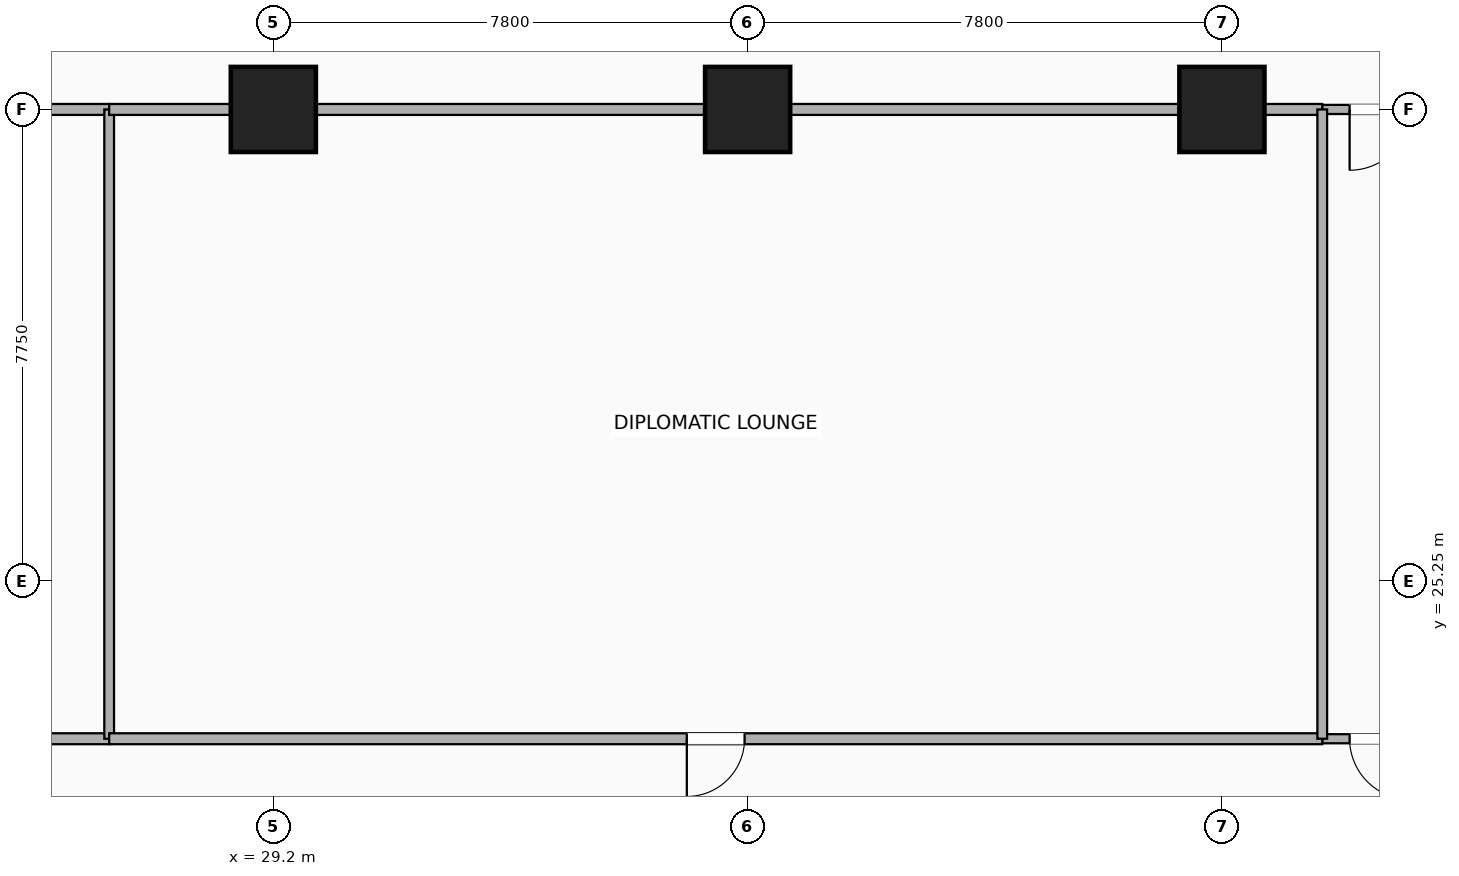
"""IFC4 building model, lengths in metres.
Left out: names, types, materials, properties, quantities, classifications, styles, units other than length and angle.
Written with IfcOpenShell. Run it as: python <this file> out.ifc"""

import sys

from ifc_helpers import new_model, si_unit, direction, frame, frame_2d, origin, origin_2d, place, context, subcontext, project, spatial, rectangle, extrude, element, fill, save


model = new_model("IFC4")
c1 = context("Model", 3, precision=1e-05, world=origin(), true_north=direction((0.0, 1.0)))
c2 = subcontext(c1, "Body", "Model", "MODEL_VIEW")
j1 = project(units=[si_unit("LENGTHUNIT", "METRE"), si_unit("PLANEANGLEUNIT", "RADIAN")], contexts=[c1])
p1 = place(None, origin())
s1 = spatial("IfcSite", under=j1, at=p1, CompositionType="ELEMENT")
p2 = place(p1, origin())
s2 = spatial("IfcBuilding", under=s1, at=p2, CompositionType="ELEMENT")
p3 = place(p2, frame((0.0, 0.0, 71.9)))
s3 = spatial("IfcBuildingStorey", under=s2, at=p3, CompositionType="ELEMENT", Elevation=71.9)
for number, where, z_axis, x_axis in (
    (1, (29.2, 33.0, -0.28), (0.0, 0.0, 1.0), (1.0, 0.0, 0.0)),
    (2, (37.0, 33.0, -0.28), (0.0, 0.0, 1.0), (1.0, 0.0, 0.0)),
    (3, (44.8, 33.0, -0.28), (0.0, 0.0, 1.0), (1.0, 0.0, 0.0)),
):
    element("IfcColumn", number, at=place(p3, frame(where, z_axis=z_axis, x_axis=x_axis)), inside=s3, PredefinedType="COLUMN", context=c2, shape_type="SweptSolid", body=[
        extrude(rectangle(XDim=1.4, YDim=1.4, at=origin_2d()), origin(), (0.0, 0.0, 1.0), 3.46),
    ])
p4 = place(p3, frame((46.45, 22.65, 0.0), z_axis=(0.0, 0.0, 1.0), x_axis=(1.0, 0.0, 0.0)))
e4 = element("IfcWall", 4, at=p4, inside=s3, PredefinedType="PARTITIONING", context=c2, shape_type="SweptSolid", body=[
    extrude(rectangle(XDim=2.0, YDim=0.15, at=frame_2d((1.0, 0.0))), origin(), (0.0, 0.0, 1.0), 3.18),
])
p5 = place(p4, frame((0.45, 0.0, 0.0)))
e5 = element("IfcOpeningElement", 5, at=p5, cuts=e4, PredefinedType="OPENING", context=c2, shape_type="SweptSolid", body=[
    extrude(rectangle(XDim=1.0, YDim=2.15, at=frame_2d((0.5, 1.075))), frame((0.0, 0.085, 0.0), z_axis=(0.0, -1.0, 0.0), x_axis=(1.0, 0.0, 0.0)), (0.0, 0.0, 1.0), 0.17),
])
p6 = place(p3, frame((46.45, 33.0, 0.0), z_axis=(0.0, 0.0, 1.0), x_axis=(1.0, 0.0, 0.0)))
e6 = element("IfcWall", 6, at=p6, inside=s3, PredefinedType="PARTITIONING", context=c2, shape_type="SweptSolid", body=[
    extrude(rectangle(XDim=2.0, YDim=0.15, at=frame_2d((1.0, 0.0))), origin(), (0.0, 0.0, 1.0), 2.47),
])
p7 = place(p6, frame((0.45, 0.0, 0.0)))
e7 = element("IfcOpeningElement", 7, at=p7, cuts=e6, PredefinedType="OPENING", context=c2, shape_type="SweptSolid", body=[
    extrude(rectangle(XDim=1.0, YDim=2.15, at=frame_2d((0.5, 1.075))), frame((0.0, 0.085, 0.0), z_axis=(0.0, -1.0, 0.0), x_axis=(1.0, 0.0, 0.0)), (0.0, 0.0, 1.0), 0.17),
])
p8 = place(p3, frame((18.65, 22.65, 0.0), z_axis=(0.0, 0.0, 1.0), x_axis=(1.0, 0.0, 0.0)))
e8 = element("IfcWall", 8, at=p8, inside=s3, PredefinedType="PARTITIONING", context=c2, shape_type="SweptSolid", body=[
    extrude(rectangle(XDim=7.85, YDim=0.18, at=frame_2d((3.925, 0.0))), origin(), (0.0, 0.0, 1.0), 2.47),
])
p9 = place(p8, frame((3.45, 0.0, 0.0)))
e9 = element("IfcOpeningElement", 9, at=p9, cuts=e8, PredefinedType="OPENING", context=c2, shape_type="SweptSolid", body=[
    extrude(rectangle(XDim=0.95, YDim=2.15, at=frame_2d((0.475, 1.075))), frame((0.0, 0.1, 0.0), z_axis=(0.0, -1.0, 0.0), x_axis=(1.0, 0.0, 0.0)), (0.0, 0.0, 1.0), 0.2),
])
p10 = place(p3, frame((18.65, 33.0, 0.0), z_axis=(0.0, 0.0, 1.0), x_axis=(1.0, 0.0, 0.0)))
e10 = element("IfcWall", 10, at=p10, inside=s3, PredefinedType="PARTITIONING", context=c2, shape_type="SweptSolid", body=[
    extrude(rectangle(XDim=7.85, YDim=0.18, at=frame_2d((3.925, 0.0))), origin(), (0.0, 0.0, 1.0), 2.47),
])
p11 = place(p3, frame((26.5, 22.65, 0.0), z_axis=(0.0, 0.0, 1.0), x_axis=(0.0, 1.0, 0.0)))
e11 = element("IfcWall", 11, at=p11, inside=s3, PredefinedType="PARTITIONING", context=c2, shape_type="SweptSolid", body=[
    extrude(rectangle(XDim=10.35, YDim=0.16, at=frame_2d((5.175, 0.0))), origin(), (0.0, 0.0, 1.0), 2.47),
])
p12 = place(p3, frame((26.5, 22.65, 0.0), z_axis=(0.0, 0.0, 1.0), x_axis=(1.0, 0.0, 0.0)))
e12 = element("IfcWall", 12, at=p12, inside=s3, PredefinedType="PARTITIONING", context=c2, shape_type="SweptSolid", body=[
    extrude(rectangle(XDim=19.95, YDim=0.18, at=frame_2d((9.975, 0.0))), origin(), (0.0, 0.0, 1.0), 2.47),
])
p13 = place(p12, frame((9.5, 0.0, 0.0)))
e13 = element("IfcOpeningElement", 13, at=p13, cuts=e12, PredefinedType="OPENING", context=c2, shape_type="SweptSolid", body=[
    extrude(rectangle(XDim=0.95, YDim=2.15, at=frame_2d((0.475, 1.075))), frame((0.0, 0.1, 0.0), z_axis=(0.0, -1.0, 0.0), x_axis=(1.0, 0.0, 0.0)), (0.0, 0.0, 1.0), 0.2),
])
p14 = place(p3, frame((26.5, 33.0, 0.0), z_axis=(0.0, 0.0, 1.0), x_axis=(1.0, 0.0, 0.0)))
e14 = element("IfcWall", 14, at=p14, inside=s3, PredefinedType="PARTITIONING", context=c2, shape_type="SweptSolid", body=[
    extrude(rectangle(XDim=19.95, YDim=0.18, at=frame_2d((9.975, 0.0))), origin(), (0.0, 0.0, 1.0), 2.47),
])
p15 = place(p3, frame((46.45, 22.65, 0.0), z_axis=(0.0, 0.0, 1.0), x_axis=(0.0, 1.0, 0.0)))
e15 = element("IfcWall", 15, at=p15, inside=s3, PredefinedType="PARTITIONING", context=c2, shape_type="SweptSolid", body=[
    extrude(rectangle(XDim=10.35, YDim=0.16, at=frame_2d((5.175, 0.0))), origin(), (0.0, 0.0, 1.0), 2.47),
])
p16 = place(p5, origin())
e16 = element("IfcDoor", 16, at=p16, inside=s3, OperationType="SINGLE_SWING_RIGHT", PredefinedType="DOOR", context=c2, shape_type="SweptSolid", body=[
    extrude(rectangle(XDim=1.0, YDim=2.15, at=frame_2d((0.5, 1.075))), frame((0.0, 0.025, 0.0), z_axis=(0.0, -1.0, 0.0), x_axis=(1.0, 0.0, 0.0)), (0.0, 0.0, 1.0), 0.05),
])
fill(e5, e16)
p17 = place(p7, origin())
e17 = element("IfcDoor", 17, at=p17, inside=s3, OperationType="SINGLE_SWING_LEFT", PredefinedType="DOOR", context=c2, shape_type="SweptSolid", body=[
    extrude(rectangle(XDim=1.0, YDim=2.15, at=frame_2d((0.5, 1.075))), frame((0.0, 0.025, 0.0), z_axis=(0.0, -1.0, 0.0), x_axis=(1.0, 0.0, 0.0)), (0.0, 0.0, 1.0), 0.05),
])
fill(e7, e17)
p18 = place(p13, origin())
e18 = element("IfcDoor", 18, at=p18, inside=s3, OperationType="SINGLE_SWING_LEFT", PredefinedType="DOOR", context=c2, shape_type="SweptSolid", body=[
    extrude(rectangle(XDim=0.95, YDim=2.15, at=frame_2d((0.475, 1.075))), frame((0.0, 0.025, 0.0), z_axis=(0.0, -1.0, 0.0), x_axis=(1.0, 0.0, 0.0)), (0.0, 0.0, 1.0), 0.05),
])
fill(e13, e18)
save(model, sys.argv[1])
